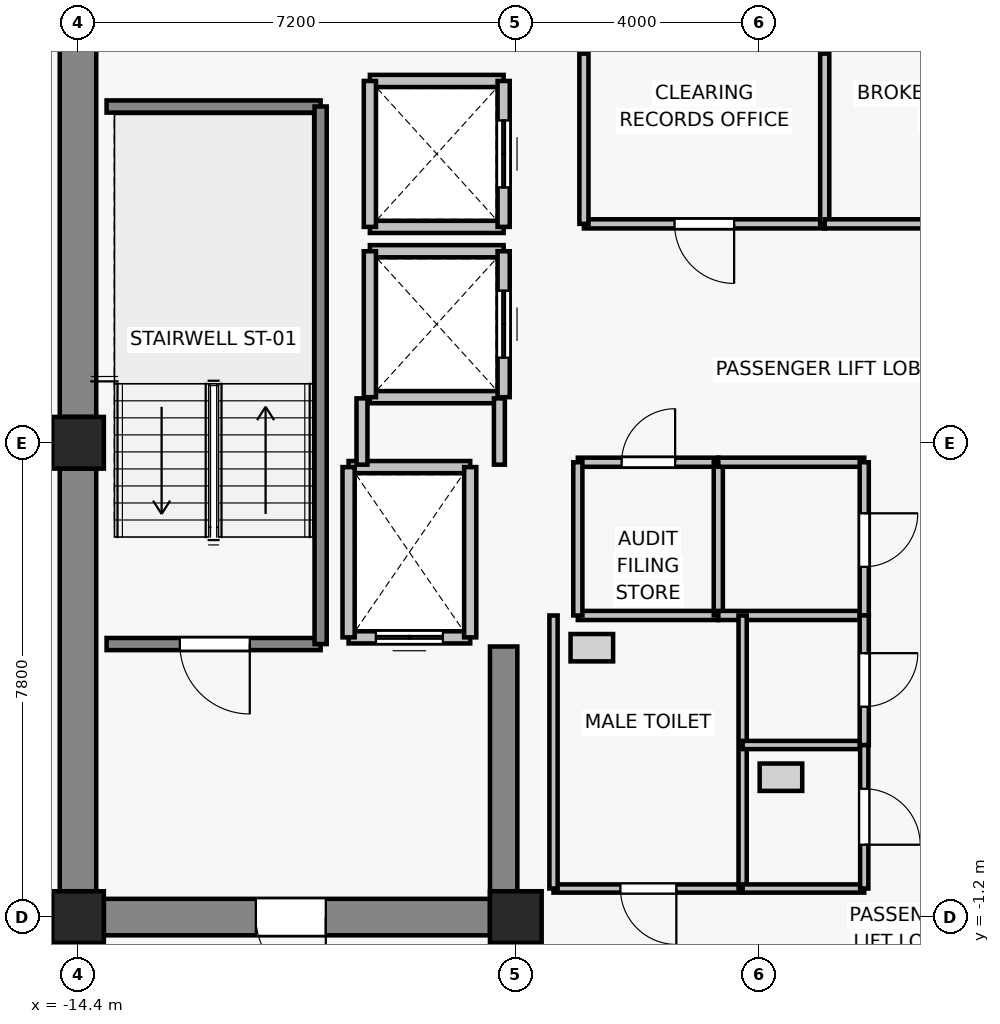
"""IFC4 building model, lengths in metres.
Left out: names, types, materials, properties, quantities, classifications, styles, units other than length and angle.
Written with IfcOpenShell. Run it as: python <this file> out.ifc"""

import sys

from ifc_helpers import new_model, si_unit, direction, frame, frame_2d, origin, origin_2d, place, context, subcontext, project, spatial, rectangle, extrude, source, transform, mapped, element, fill, save


model = new_model("IFC4")
c1 = context("Model", 3, precision=1e-05, world=origin(), true_north=direction((0.0, 1.0)))
c2 = subcontext(c1, "Body", "Model", "MODEL_VIEW")
j1 = project(units=[si_unit("LENGTHUNIT", "METRE"), si_unit("PLANEANGLEUNIT", "RADIAN")], contexts=[c1])
p1 = place(None, origin())
s1 = spatial("IfcSite", under=j1, at=p1, CompositionType="ELEMENT")
p2 = place(p1, origin())
s2 = spatial("IfcBuilding", under=s1, at=p2, CompositionType="ELEMENT")
p3 = place(p2, frame((0.0, 0.0, 245.2)))
s3 = spatial("IfcBuildingStorey", under=s2, at=p3, CompositionType="ELEMENT", Elevation=245.2)
for number, where, z_axis, x_axis in (
    (1, (-14.4, -1.2, 0.0), (0.0, 0.0, 1.0), (1.0, 0.0, 0.0)),
    (2, (-7.2, -1.2, 0.0), (0.0, 0.0, 1.0), (1.0, 0.0, 0.0)),
    (3, (-14.4, 6.6, 0.0), (0.0, 0.0, 1.0), (1.0, 0.0, 0.0)),
):
    element("IfcColumn", number, at=place(p3, frame(where, z_axis=z_axis, x_axis=x_axis)), inside=s3, PredefinedType="COLUMN", context=c2, shape_type="SweptSolid", body=[
        extrude(rectangle(XDim=0.85, YDim=0.85, at=origin_2d()), origin(), (0.0, 0.0, 1.0), 3.3),
    ])
p4 = place(p3, frame((-14.4, -0.775, 0.0), z_axis=(0.0, 0.0, 1.0), x_axis=(0.0, 1.0, 0.0)))
e4 = element("IfcWall", 4, at=p4, inside=s3, PredefinedType="SHEAR", context=c2, shape_type="SweptSolid", body=[
    extrude(rectangle(XDim=6.95, YDim=0.6, at=frame_2d((3.475, 0.0))), origin(), (0.0, 0.0, 1.0), 3.075),
])
p5 = place(p3, frame((-14.4, 7.025, 0.0), z_axis=(0.0, 0.0, 1.0), x_axis=(0.0, 1.0, 0.0)))
e5 = element("IfcWall", 5, at=p5, inside=s3, PredefinedType="SHEAR", context=c2, shape_type="SweptSolid", body=[
    extrude(rectangle(XDim=6.05, YDim=0.6, at=frame_2d((3.025, 0.0))), origin(), (0.0, 0.0, 1.0), 3.075),
])
p6 = place(p3, frame((-7.625, -1.2, 0.0), z_axis=(0.0, 0.0, 1.0), x_axis=(-1.0, 0.0, 0.0)))
e6 = element("IfcWall", 6, at=p6, inside=s3, PredefinedType="SHEAR", context=c2, shape_type="SweptSolid", body=[
    extrude(rectangle(XDim=6.35, YDim=0.6, at=frame_2d((3.175, 0.0))), origin(), (0.0, 0.0, 1.0), 3.075),
])
p7 = place(p6, frame((2.7, 0.0, 0.0)))
e7 = element("IfcOpeningElement", 7, at=p7, cuts=e6, PredefinedType="OPENING", context=c2, shape_type="SweptSolid", body=[
    extrude(rectangle(XDim=1.15, YDim=2.15, at=frame_2d((0.575, 1.075))), frame((0.0, 0.31, 0.0), z_axis=(0.0, -1.0, 0.0), x_axis=(1.0, 0.0, 0.0)), (0.0, 0.0, 1.0), 0.62),
])
p8 = place(p3, frame((-7.4, -0.9, 0.0), z_axis=(0.0, 0.0, 1.0), x_axis=(0.0, 1.0, 0.0)))
e8 = element("IfcWall", 8, at=p8, inside=s3, PredefinedType="SHEAR", context=c2, shape_type="SweptSolid", body=[
    extrude(rectangle(XDim=4.15, YDim=0.45, at=frame_2d((2.075, 0.0))), origin(), (0.0, 0.0, 1.0), 3.075),
])
p9 = place(p3, frame((-7.95, 3.4, 0.0), z_axis=(0.0, 0.0, 1.0), x_axis=(-1.0, 0.0, 0.0)))
e9 = element("IfcWall", 9, at=p9, inside=s3, PredefinedType="SOLIDWALL", context=c2, shape_type="SweptSolid", body=[
    extrude(rectangle(XDim=2.0, YDim=0.2, at=frame_2d((1.0, 0.0))), origin(), (0.0, 0.0, 1.0), 3.075),
])
p10 = place(p9, frame((0.45, 0.0, 0.0)))
e10 = element("IfcOpeningElement", 10, at=p10, cuts=e9, PredefinedType="OPENING", context=c2, shape_type="SweptSolid", body=[
    extrude(rectangle(XDim=1.1, YDim=2.2, at=frame_2d((0.55, 1.1))), frame((0.0, 0.11, 0.0), z_axis=(0.0, -1.0, 0.0), x_axis=(1.0, 0.0, 0.0)), (0.0, 0.0, 1.0), 0.22),
])
p11 = place(p3, frame((-9.95, 6.2, 0.0), z_axis=(0.0, 0.0, 1.0), x_axis=(1.0, 0.0, 0.0)))
e11 = element("IfcWall", 11, at=p11, inside=s3, PredefinedType="SOLIDWALL", context=c2, shape_type="SweptSolid", body=[
    extrude(rectangle(XDim=2.0, YDim=0.2, at=frame_2d((1.0, 0.0))), origin(), (0.0, 0.0, 1.0), 3.075),
])
for number, where, z_axis, x_axis in (
    (12, (-9.95, 3.4, 0.0), (0.0, 0.0, 1.0), (0.0, 1.0, 0.0)),
    (13, (-7.95, 6.2, 0.0), (0.0, 0.0, 1.0), (0.0, -1.0, 0.0)),
):
    element("IfcWall", number, at=place(p3, frame(where, z_axis=z_axis, x_axis=x_axis)), inside=s3, PredefinedType="SOLIDWALL", context=c2, shape_type="SweptSolid", body=[
        extrude(rectangle(XDim=2.8, YDim=0.2, at=frame_2d((1.4, 0.0))), origin(), (0.0, 0.0, 1.0), 3.075),
    ])
for number, where, z_axis, x_axis in (
    (14, (-7.4, 7.35, 0.0), (0.0, 0.0, 1.0), (-1.0, 0.0, 0.0)),
    (15, (-9.6, 9.75, 0.0), (0.0, 0.0, 1.0), (1.0, 0.0, 0.0)),
):
    element("IfcWall", number, at=place(p3, frame(where, z_axis=z_axis, x_axis=x_axis)), inside=s3, PredefinedType="SOLIDWALL", context=c2, shape_type="SweptSolid", body=[
        extrude(rectangle(XDim=2.2, YDim=0.2, at=frame_2d((1.1, 0.0))), origin(), (0.0, 0.0, 1.0), 2.615),
    ])
p12 = place(p3, frame((-9.6, 7.35, 0.0), z_axis=(0.0, 0.0, 1.0), x_axis=(0.0, 1.0, 0.0)))
e16 = element("IfcWall", 16, at=p12, inside=s3, PredefinedType="SOLIDWALL", context=c2, shape_type="SweptSolid", body=[
    extrude(rectangle(XDim=2.4, YDim=0.2, at=frame_2d((1.2, 0.0))), origin(), (0.0, 0.0, 1.0), 3.075),
])
p13 = place(p3, frame((-7.4, 9.75, 0.0), z_axis=(0.0, 0.0, 1.0), x_axis=(0.0, -1.0, 0.0)))
e17 = element("IfcWall", 17, at=p13, inside=s3, PredefinedType="SOLIDWALL", context=c2, shape_type="SweptSolid", body=[
    extrude(rectangle(XDim=2.4, YDim=0.2, at=frame_2d((1.2, 0.0))), origin(), (0.0, 0.0, 1.0), 2.615),
])
p14 = place(p13, frame((0.65, 0.0, 0.0)))
e18 = element("IfcOpeningElement", 18, at=p14, cuts=e17, PredefinedType="OPENING", context=c2, shape_type="SweptSolid", body=[
    extrude(rectangle(XDim=1.1, YDim=2.2, at=frame_2d((0.55, 1.1))), frame((0.0, 0.11, 0.0), z_axis=(0.0, -1.0, 0.0), x_axis=(1.0, 0.0, 0.0)), (0.0, 0.0, 1.0), 0.22),
])
for number, where, z_axis, x_axis in (
    (19, (-7.4, 10.15, 0.0), (0.0, 0.0, 1.0), (-1.0, 0.0, 0.0)),
    (20, (-9.6, 12.55, 0.0), (0.0, 0.0, 1.0), (1.0, 0.0, 0.0)),
):
    element("IfcWall", number, at=place(p3, frame(where, z_axis=z_axis, x_axis=x_axis)), inside=s3, PredefinedType="SOLIDWALL", context=c2, shape_type="SweptSolid", body=[
        extrude(rectangle(XDim=2.2, YDim=0.2, at=frame_2d((1.1, 0.0))), origin(), (0.0, 0.0, 1.0), 2.615),
    ])
p15 = place(p3, frame((-9.6, 10.15, 0.0), z_axis=(0.0, 0.0, 1.0), x_axis=(0.0, 1.0, 0.0)))
e21 = element("IfcWall", 21, at=p15, inside=s3, PredefinedType="SOLIDWALL", context=c2, shape_type="SweptSolid", body=[
    extrude(rectangle(XDim=2.4, YDim=0.2, at=frame_2d((1.2, 0.0))), origin(), (0.0, 0.0, 1.0), 3.075),
])
p16 = place(p3, frame((-7.4, 12.55, 0.0), z_axis=(0.0, 0.0, 1.0), x_axis=(0.0, -1.0, 0.0)))
e22 = element("IfcWall", 22, at=p16, inside=s3, PredefinedType="SOLIDWALL", context=c2, shape_type="SweptSolid", body=[
    extrude(rectangle(XDim=2.4, YDim=0.2, at=frame_2d((1.2, 0.0))), origin(), (0.0, 0.0, 1.0), 2.615),
])
p17 = place(p16, frame((0.65, 0.0, 0.0)))
e23 = element("IfcOpeningElement", 23, at=p17, cuts=e22, PredefinedType="OPENING", context=c2, shape_type="SweptSolid", body=[
    extrude(rectangle(XDim=1.1, YDim=2.2, at=frame_2d((0.55, 1.1))), frame((0.0, 0.11, 0.0), z_axis=(0.0, -1.0, 0.0), x_axis=(1.0, 0.0, 0.0)), (0.0, 0.0, 1.0), 0.22),
])
p18 = place(p3, frame((-10.41, 3.29, 0.0), z_axis=(0.0, 0.0, 1.0), x_axis=(-1.0, 0.0, 0.0)))
e24 = element("IfcWall", 24, at=p18, inside=s3, PredefinedType="SOLIDWALL", context=c2, shape_type="SweptSolid", body=[
    extrude(rectangle(XDim=3.52, YDim=0.2, at=frame_2d((1.76, 0.0))), origin(), (0.0, 0.0, 1.0), 3.075),
])
p19 = place(p18, frame((1.165, 0.0, 0.0)))
e25 = element("IfcOpeningElement", 25, at=p19, cuts=e24, PredefinedType="OPENING", context=c2, shape_type="SweptSolid", body=[
    extrude(rectangle(XDim=1.15, YDim=2.15, at=frame_2d((0.575, 1.075))), frame((0.0, 0.11, 0.0), z_axis=(0.0, -1.0, 0.0), x_axis=(1.0, 0.0, 0.0)), (0.0, 0.0, 1.0), 0.22),
])
p20 = place(p3, frame((-13.93, 12.13, 0.0), z_axis=(0.0, 0.0, 1.0), x_axis=(1.0, 0.0, 0.0)))
e26 = element("IfcWall", 26, at=p20, inside=s3, PredefinedType="SOLIDWALL", context=c2, shape_type="SweptSolid", body=[
    extrude(rectangle(XDim=3.52, YDim=0.2, at=frame_2d((1.76, 0.0))), origin(), (0.0, 0.0, 1.0), 3.075),
])
p21 = place(p3, frame((-10.41, 12.13, 0.0), z_axis=(0.0, 0.0, 1.0), x_axis=(0.0, -1.0, 0.0)))
e27 = element("IfcWall", 27, at=p21, inside=s3, PredefinedType="SOLIDWALL", context=c2, shape_type="SweptSolid", body=[
    extrude(rectangle(XDim=8.84, YDim=0.2, at=frame_2d((4.42, 0.0))), origin(), (0.0, 0.0, 1.0), 3.075),
])
p22 = place(p3, frame((-9.73, 6.24, 0.0), z_axis=(0.0, 0.0, 1.0), x_axis=(0.0, 1.0, 0.0)))
e28 = element("IfcWall", 28, at=p22, inside=s3, PredefinedType="PARTITIONING", context=c2, shape_type="SweptSolid", body=[
    extrude(rectangle(XDim=1.09, YDim=0.18, at=frame_2d((0.545, 0.0))), origin(), (0.0, 0.0, 1.0), 3.075),
])
p23 = place(p3, frame((-7.47, 7.33, 0.0), z_axis=(0.0, 0.0, 1.0), x_axis=(0.0, -1.0, 0.0)))
e29 = element("IfcWall", 29, at=p23, inside=s3, PredefinedType="PARTITIONING", context=c2, shape_type="SweptSolid", body=[
    extrude(rectangle(XDim=1.09, YDim=0.18, at=frame_2d((0.545, 0.0))), origin(), (0.0, 0.0, 1.0), 2.615),
])
p24 = place(p3, frame((-2.12, 10.2, 0.0), z_axis=(0.0, 0.0, 1.0), x_axis=(-1.0, 0.0, 0.0)))
e30 = element("IfcWall", 30, at=p24, inside=s3, PredefinedType="PARTITIONING", context=c2, shape_type="SweptSolid", body=[
    extrude(rectangle(XDim=3.96, YDim=0.15, at=frame_2d((1.98, 0.0))), origin(), (0.0, 0.0, 1.0), 3.075),
])
p25 = place(p24, frame((1.49, 0.0, 0.0)))
e31 = element("IfcOpeningElement", 31, at=p25, cuts=e30, PredefinedType="OPENING", context=c2, shape_type="SweptSolid", body=[
    extrude(rectangle(XDim=0.98, YDim=2.15, at=frame_2d((0.49, 1.075))), frame((0.0, 0.085, 0.0), z_axis=(0.0, -1.0, 0.0), x_axis=(1.0, 0.0, 0.0)), (0.0, 0.0, 1.0), 0.17),
])
for number, where, z_axis, x_axis in (
    (32, (-6.08, 10.2, 0.0), (0.0, 0.0, 1.0), (0.0, 1.0, 0.0)),
    (33, (-2.12, 13.0, 0.0), (0.0, 0.0, 1.0), (0.0, -1.0, 0.0)),
):
    element("IfcWall", number, at=place(p3, frame(where, z_axis=z_axis, x_axis=x_axis)), inside=s3, PredefinedType="PARTITIONING", context=c2, shape_type="SweptSolid", body=[
        extrude(rectangle(XDim=2.8, YDim=0.15, at=frame_2d((1.4, 0.0))), origin(), (0.0, 0.0, 1.0), 3.075),
    ])
p26 = place(p3, frame((2.04, 10.2, 0.0), z_axis=(0.0, 0.0, 1.0), x_axis=(-1.0, 0.0, 0.0)))
e34 = element("IfcWall", 34, at=p26, inside=s3, PredefinedType="PARTITIONING", context=c2, shape_type="SweptSolid", body=[
    extrude(rectangle(XDim=4.16, YDim=0.15, at=frame_2d((2.08, 0.0))), origin(), (0.0, 0.0, 1.0), 3.075),
])
p27 = place(p26, frame((1.55, 0.0, 0.0)))
e35 = element("IfcOpeningElement", 35, at=p27, cuts=e34, PredefinedType="OPENING", context=c2, shape_type="SweptSolid", body=[
    extrude(rectangle(XDim=0.98, YDim=2.15, at=frame_2d((0.49, 1.075))), frame((0.0, 0.085, 0.0), z_axis=(0.0, -1.0, 0.0), x_axis=(1.0, 0.0, 0.0)), (0.0, 0.0, 1.0), 0.17),
])
p28 = place(p3, frame((-3.87, 3.76, 0.0), z_axis=(0.0, 0.0, 1.0), x_axis=(-1.0, 0.0, 0.0)))
e36 = element("IfcWall", 36, at=p28, inside=s3, PredefinedType="PARTITIONING", context=c2, shape_type="SweptSolid", body=[
    extrude(rectangle(XDim=2.31, YDim=0.15, at=frame_2d((1.155, 0.0))), origin(), (0.0, 0.0, 1.0), 3.075),
])
p29 = place(p3, frame((-6.18, 6.28, 0.0), z_axis=(0.0, 0.0, 1.0), x_axis=(1.0, 0.0, 0.0)))
e37 = element("IfcWall", 37, at=p29, inside=s3, PredefinedType="PARTITIONING", context=c2, shape_type="SweptSolid", body=[
    extrude(rectangle(XDim=2.31, YDim=0.15, at=frame_2d((1.155, 0.0))), origin(), (0.0, 0.0, 1.0), 3.075),
])
p30 = place(p29, frame((0.72, 0.0, 0.0)))
e38 = element("IfcOpeningElement", 38, at=p30, cuts=e37, PredefinedType="OPENING", context=c2, shape_type="SweptSolid", body=[
    extrude(rectangle(XDim=0.88, YDim=2.1, at=frame_2d((0.44, 1.05))), frame((0.0, 0.085, 0.0), z_axis=(0.0, -1.0, 0.0), x_axis=(1.0, 0.0, 0.0)), (0.0, 0.0, 1.0), 0.17),
])
for number, where, z_axis, x_axis in (
    (39, (-6.18, 3.76, 0.0), (0.0, 0.0, 1.0), (0.0, 1.0, 0.0)),
    (40, (-3.87, 6.28, 0.0), (0.0, 0.0, 1.0), (0.0, -1.0, 0.0)),
):
    element("IfcWall", number, at=place(p3, frame(where, z_axis=z_axis, x_axis=x_axis)), inside=s3, PredefinedType="PARTITIONING", context=c2, shape_type="SweptSolid", body=[
        extrude(rectangle(XDim=2.52, YDim=0.15, at=frame_2d((1.26, 0.0))), origin(), (0.0, 0.0, 1.0), 3.075),
    ])
for number, where, z_axis, x_axis in (
    (41, (-1.47, 3.76, 0.0), (0.0, 0.0, 1.0), (-1.0, 0.0, 0.0)),
    (42, (-3.87, 6.28, 0.0), (0.0, 0.0, 1.0), (1.0, 0.0, 0.0)),
):
    element("IfcWall", number, at=place(p3, frame(where, z_axis=z_axis, x_axis=x_axis)), inside=s3, PredefinedType="PARTITIONING", context=c2, shape_type="SweptSolid", body=[
        extrude(rectangle(XDim=2.4, YDim=0.15, at=frame_2d((1.2, 0.0))), origin(), (0.0, 0.0, 1.0), 3.075),
    ])
p31 = place(p3, frame((-1.47, 6.28, 0.0), z_axis=(0.0, 0.0, 1.0), x_axis=(0.0, -1.0, 0.0)))
e43 = element("IfcWall", 43, at=p31, inside=s3, PredefinedType="PARTITIONING", context=c2, shape_type="SweptSolid", body=[
    extrude(rectangle(XDim=2.52, YDim=0.15, at=frame_2d((1.26, 0.0))), origin(), (0.0, 0.0, 1.0), 3.075),
])
p32 = place(p31, frame((0.84, 0.0, 0.0)))
e44 = element("IfcOpeningElement", 44, at=p32, cuts=e43, PredefinedType="OPENING", context=c2, shape_type="SweptSolid", body=[
    extrude(rectangle(XDim=0.88, YDim=2.1, at=frame_2d((0.44, 1.05))), frame((0.0, 0.085, 0.0), z_axis=(0.0, -1.0, 0.0), x_axis=(1.0, 0.0, 0.0)), (0.0, 0.0, 1.0), 0.17),
])
p33 = place(p3, frame((-3.47, -0.73, 0.0), z_axis=(0.0, 0.0, 1.0), x_axis=(-1.0, 0.0, 0.0)))
e45 = element("IfcWall", 45, at=p33, inside=s3, PredefinedType="PARTITIONING", context=c2, shape_type="SweptSolid", body=[
    extrude(rectangle(XDim=3.11, YDim=0.135, at=frame_2d((1.555, 0.0))), origin(), (0.0, 0.0, 1.0), 3.075),
])
p34 = place(p33, frame((1.09, 0.0, 0.0)))
e46 = element("IfcOpeningElement", 46, at=p34, cuts=e45, PredefinedType="OPENING", context=c2, shape_type="SweptSolid", body=[
    extrude(rectangle(XDim=0.92, YDim=2.1, at=frame_2d((0.46, 1.05))), frame((0.0, 0.077, 0.0), z_axis=(0.0, -1.0, 0.0), x_axis=(1.0, 0.0, 0.0)), (0.0, 0.0, 1.0), 0.155),
])
for number, where, z_axis, x_axis in (
    (47, (-6.58, -0.73, 0.0), (0.0, 0.0, 1.0), (0.0, 1.0, 0.0)),
    (48, (-3.47, 3.76, 0.0), (0.0, 0.0, 1.0), (0.0, -1.0, 0.0)),
):
    element("IfcWall", number, at=place(p3, frame(where, z_axis=z_axis, x_axis=x_axis)), inside=s3, PredefinedType="PARTITIONING", context=c2, shape_type="SweptSolid", body=[
        extrude(rectangle(XDim=4.49, YDim=0.135, at=frame_2d((2.245, 0.0))), origin(), (0.0, 0.0, 1.0), 3.075),
    ])
for number, where, z_axis, x_axis in (
    (49, (-1.47, -0.73, 0.0), (0.0, 0.0, 1.0), (-1.0, 0.0, 0.0)),
    (50, (-3.47, 1.63, 0.0), (0.0, 0.0, 1.0), (1.0, 0.0, 0.0)),
):
    element("IfcWall", number, at=place(p3, frame(where, z_axis=z_axis, x_axis=x_axis)), inside=s3, PredefinedType="PARTITIONING", context=c2, shape_type="SweptSolid", body=[
        extrude(rectangle(XDim=2.0, YDim=0.135, at=frame_2d((1.0, 0.0))), origin(), (0.0, 0.0, 1.0), 3.075),
    ])
p35 = place(p3, frame((-1.47, 1.63, 0.0), z_axis=(0.0, 0.0, 1.0), x_axis=(0.0, -1.0, 0.0)))
e51 = element("IfcWall", 51, at=p35, inside=s3, PredefinedType="PARTITIONING", context=c2, shape_type="SweptSolid", body=[
    extrude(rectangle(XDim=2.36, YDim=0.135, at=frame_2d((1.18, 0.0))), origin(), (0.0, 0.0, 1.0), 3.075),
])
p36 = place(p35, frame((0.72, 0.0, 0.0)))
e52 = element("IfcOpeningElement", 52, at=p36, cuts=e51, PredefinedType="OPENING", context=c2, shape_type="SweptSolid", body=[
    extrude(rectangle(XDim=0.92, YDim=2.1, at=frame_2d((0.46, 1.05))), frame((0.0, 0.077, 0.0), z_axis=(0.0, -1.0, 0.0), x_axis=(1.0, 0.0, 0.0)), (0.0, 0.0, 1.0), 0.155),
])
p37 = place(p3, frame((-1.47, 3.76, 0.0), z_axis=(0.0, 0.0, 1.0), x_axis=(0.0, -1.0, 0.0)))
e53 = element("IfcWall", 53, at=p37, inside=s3, PredefinedType="PARTITIONING", context=c2, shape_type="SweptSolid", body=[
    extrude(rectangle(XDim=2.13, YDim=0.15, at=frame_2d((1.065, 0.0))), origin(), (0.0, 0.0, 1.0), 3.075),
])
p38 = place(p37, frame((0.62, 0.0, 0.0)))
e54 = element("IfcOpeningElement", 54, at=p38, cuts=e53, PredefinedType="OPENING", context=c2, shape_type="SweptSolid", body=[
    extrude(rectangle(XDim=0.88, YDim=2.1, at=frame_2d((0.44, 1.05))), frame((0.0, 0.085, 0.0), z_axis=(0.0, -1.0, 0.0), x_axis=(1.0, 0.0, 0.0)), (0.0, 0.0, 1.0), 0.17),
])
m1 = source(origin(), c2, "Body", "SweptSolid", [
    extrude(rectangle(XDim=1.1, YDim=2.2, at=frame_2d((0.55, 1.1))), frame((0.0, 0.025, 0.0), z_axis=(0.0, -1.0, 0.0), x_axis=(1.0, 0.0, 0.0)), (0.0, 0.0, 1.0), 0.05),
])
p39 = place(p10, origin())
e55 = element("IfcDoor", 55, at=p39, inside=s3, OperationType="DOUBLE_DOOR_SLIDING", PredefinedType="DOOR", context=c2, shape_type="MappedRepresentation", body=[
    mapped(m1, transform((0.0, 0.0, 0.0), x_axis=(1.0, 0.0, 0.0), y_axis=(0.0, 1.0, 0.0), z_axis=(0.0, 0.0, 1.0), scale=1.0)),
])
fill(e10, e55)
p40 = place(p14, origin())
e56 = element("IfcDoor", 56, at=p40, inside=s3, OperationType="DOUBLE_DOOR_SLIDING", PredefinedType="DOOR", context=c2, shape_type="MappedRepresentation", body=[
    mapped(m1, transform((0.0, 0.0, 0.0), x_axis=(1.0, 0.0, 0.0), y_axis=(0.0, 1.0, 0.0), z_axis=(0.0, 0.0, 1.0), scale=1.0)),
])
fill(e18, e56)
p41 = place(p17, origin())
e57 = element("IfcDoor", 57, at=p41, inside=s3, OperationType="DOUBLE_DOOR_SLIDING", PredefinedType="DOOR", context=c2, shape_type="MappedRepresentation", body=[
    mapped(m1, transform((0.0, 0.0, 0.0), x_axis=(1.0, 0.0, 0.0), y_axis=(0.0, 1.0, 0.0), z_axis=(0.0, 0.0, 1.0), scale=1.0)),
])
fill(e23, e57)
m2 = source(origin(), c2, "Body", "SweptSolid", [
    extrude(rectangle(XDim=1.15, YDim=2.15, at=frame_2d((0.575, 1.075))), frame((0.0, 0.025, 0.0), z_axis=(0.0, -1.0, 0.0), x_axis=(1.0, 0.0, 0.0)), (0.0, 0.0, 1.0), 0.05),
])
p42 = place(p19, origin())
e58 = element("IfcDoor", 58, at=p42, inside=s3, OperationType="SINGLE_SWING_LEFT", PredefinedType="DOOR", context=c2, shape_type="MappedRepresentation", body=[
    mapped(m2, transform((0.0, 0.0, 0.0), x_axis=(1.0, 0.0, 0.0), y_axis=(0.0, 1.0, 0.0), z_axis=(0.0, 0.0, 1.0), scale=1.0)),
])
fill(e25, e58)
p43 = place(p7, origin())
e59 = element("IfcDoor", 59, at=p43, inside=s3, OperationType="SINGLE_SWING_LEFT", PredefinedType="DOOR", context=c2, shape_type="MappedRepresentation", body=[
    mapped(m2, transform((0.0, 0.0, 0.0), x_axis=(1.0, 0.0, 0.0), y_axis=(0.0, 1.0, 0.0), z_axis=(0.0, 0.0, 1.0), scale=1.0)),
])
fill(e7, e59)
m3 = source(origin(), c2, "Body", "SweptSolid", [
    extrude(rectangle(XDim=0.98, YDim=2.15, at=frame_2d((0.49, 1.075))), frame((0.0, 0.025, 0.0), z_axis=(0.0, -1.0, 0.0), x_axis=(1.0, 0.0, 0.0)), (0.0, 0.0, 1.0), 0.05),
])
p44 = place(p25, origin())
e60 = element("IfcDoor", 60, at=p44, inside=s3, OperationType="SINGLE_SWING_LEFT", PredefinedType="DOOR", context=c2, shape_type="MappedRepresentation", body=[
    mapped(m3, transform((0.0, 0.0, 0.0), x_axis=(1.0, 0.0, 0.0), y_axis=(0.0, 1.0, 0.0), z_axis=(0.0, 0.0, 1.0), scale=1.0)),
])
fill(e31, e60)
m4 = source(origin(), c2, "Body", "SweptSolid", [
    extrude(rectangle(XDim=0.88, YDim=2.1, at=frame_2d((0.44, 1.05))), frame((0.0, 0.025, 0.0), z_axis=(0.0, -1.0, 0.0), x_axis=(1.0, 0.0, 0.0)), (0.0, 0.0, 1.0), 0.05),
])
p45 = place(p30, origin())
e61 = element("IfcDoor", 61, at=p45, inside=s3, OperationType="SINGLE_SWING_RIGHT", PredefinedType="DOOR", context=c2, shape_type="MappedRepresentation", body=[
    mapped(m4, transform((0.0, 0.0, 0.0), x_axis=(1.0, 0.0, 0.0), y_axis=(0.0, 1.0, 0.0), z_axis=(0.0, 0.0, 1.0), scale=1.0)),
])
fill(e38, e61)
p46 = place(p32, origin())
e62 = element("IfcDoor", 62, at=p46, inside=s3, OperationType="SINGLE_SWING_LEFT", PredefinedType="DOOR", context=c2, shape_type="MappedRepresentation", body=[
    mapped(m4, transform((0.0, 0.0, 0.0), x_axis=(1.0, 0.0, 0.0), y_axis=(0.0, 1.0, 0.0), z_axis=(0.0, 0.0, 1.0), scale=1.0)),
])
fill(e44, e62)
m5 = source(origin(), c2, "Body", "SweptSolid", [
    extrude(rectangle(XDim=0.92, YDim=2.1, at=frame_2d((0.46, 1.05))), frame((0.0, 0.025, 0.0), z_axis=(0.0, -1.0, 0.0), x_axis=(1.0, 0.0, 0.0)), (0.0, 0.0, 1.0), 0.05),
])
p47 = place(p34, origin())
e63 = element("IfcDoor", 63, at=p47, inside=s3, OperationType="SINGLE_SWING_LEFT", PredefinedType="DOOR", context=c2, shape_type="MappedRepresentation", body=[
    mapped(m5, transform((0.0, 0.0, 0.0), x_axis=(1.0, 0.0, 0.0), y_axis=(0.0, 1.0, 0.0), z_axis=(0.0, 0.0, 1.0), scale=1.0)),
])
fill(e46, e63)
p48 = place(p36, origin())
e64 = element("IfcDoor", 64, at=p48, inside=s3, OperationType="SINGLE_SWING_RIGHT", PredefinedType="DOOR", context=c2, shape_type="MappedRepresentation", body=[
    mapped(m5, transform((0.0, 0.0, 0.0), x_axis=(1.0, 0.0, 0.0), y_axis=(0.0, 1.0, 0.0), z_axis=(0.0, 0.0, 1.0), scale=1.0)),
])
fill(e52, e64)
p49 = place(p38, origin())
e65 = element("IfcDoor", 65, at=p49, inside=s3, OperationType="SINGLE_SWING_LEFT", PredefinedType="DOOR", context=c2, shape_type="MappedRepresentation", body=[
    mapped(m4, transform((0.0, 0.0, 0.0), x_axis=(1.0, 0.0, 0.0), y_axis=(0.0, 1.0, 0.0), z_axis=(0.0, 0.0, 1.0), scale=1.0)),
])
fill(e54, e65)
save(model, sys.argv[1])
